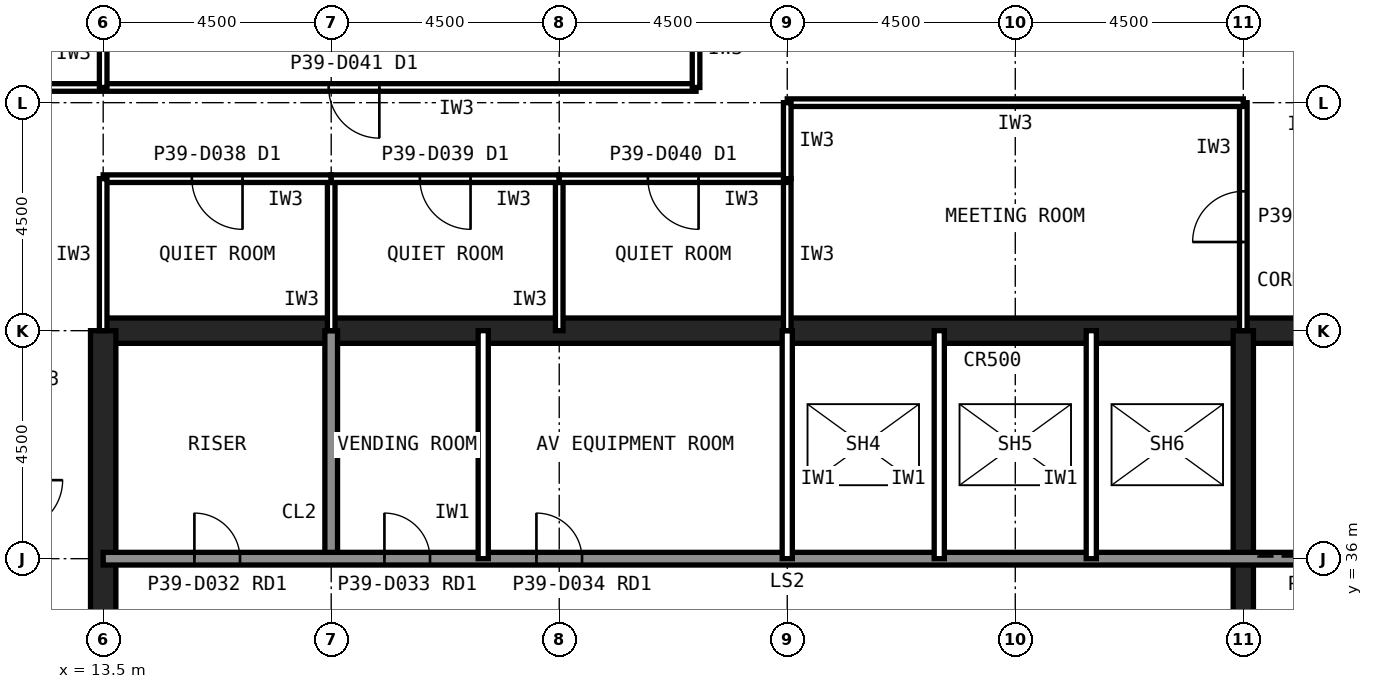
"""IFC4 building model, lengths in metres.
Left out: names, types, materials, properties, quantities, classifications, styles, units other than length and angle.
Written with IfcOpenShell. Run it as: python <this file> out.ifc"""

import sys

from ifc_helpers import new_model, si_unit, direction, frame, frame_2d, origin, place, context, subcontext, project, spatial, rectangle, extrude, element, fill, save


model = new_model("IFC4")
c1 = context("Model", 3, precision=1e-05, world=origin(), true_north=direction((0.0, 1.0)))
c2 = subcontext(c1, "Body", "Model", "MODEL_VIEW")
j1 = project(units=[si_unit("LENGTHUNIT", "METRE"), si_unit("PLANEANGLEUNIT", "RADIAN")], contexts=[c1])
p1 = place(None, origin())
s1 = spatial("IfcSite", under=j1, at=p1, CompositionType="ELEMENT")
p2 = place(p1, origin())
s2 = spatial("IfcBuilding", under=s1, at=p2, CompositionType="ELEMENT")
p3 = place(p2, frame((0.0, 0.0, 167.6)))
s3 = spatial("IfcBuildingStorey", under=s2, at=p3, CompositionType="ELEMENT", Elevation=167.6)
p4 = place(p3, frame((40.5, 40.5, 0.0), z_axis=(0.0, 0.0, 1.0), x_axis=(-1.0, 0.0, 0.0)))
e1 = element("IfcWall", 1, at=p4, inside=s3, PredefinedType="SHEAR", context=c2, shape_type="SweptSolid", body=[
    extrude(rectangle(XDim=27.0, YDim=0.5, at=frame_2d((13.5, 0.0))), origin(), (0.0, 0.0, 1.0), 4.0),
])
p5 = place(p3, frame((13.5, 40.5, 0.0), z_axis=(0.0, 0.0, 1.0), x_axis=(0.0, -1.0, 0.0)))
e2 = element("IfcWall", 2, at=p5, inside=s3, PredefinedType="SHEAR", context=c2, shape_type="SweptSolid", body=[
    extrude(rectangle(XDim=27.0, YDim=0.5, at=frame_2d((13.5, 0.0))), origin(), (0.0, 0.0, 1.0), 4.0),
])
p6 = place(p5, frame((19.65, 0.0, 0.0)))
e3 = element("IfcOpeningElement", 3, at=p6, cuts=e2, PredefinedType="OPENING", context=c2, shape_type="SweptSolid", body=[
    extrude(rectangle(XDim=1.2, YDim=2.1, at=frame_2d((0.6, 1.05))), frame((0.0, 0.26, 0.0), z_axis=(0.0, -1.0, 0.0), x_axis=(1.0, 0.0, 0.0)), (0.0, 0.0, 1.0), 0.52),
])
p7 = place(p5, frame((5.85, 0.0, 0.0)))
e4 = element("IfcOpeningElement", 4, at=p7, cuts=e2, PredefinedType="OPENING", context=c2, shape_type="SweptSolid", body=[
    extrude(rectangle(XDim=1.8, YDim=2.1, at=frame_2d((0.9, 1.05))), frame((0.0, 0.26, 0.0), z_axis=(0.0, -1.0, 0.0), x_axis=(1.0, 0.0, 0.0)), (0.0, 0.0, 1.0), 0.52),
])
p8 = place(p3, frame((18.0, 36.0, 0.0), z_axis=(0.0, 0.0, 1.0), x_axis=(0.0, 1.0, 0.0)))
e5 = element("IfcWall", 5, at=p8, inside=s3, PredefinedType="SOLIDWALL", context=c2, shape_type="SweptSolid", body=[
    extrude(rectangle(XDim=4.5, YDim=0.25, at=frame_2d((2.25, 0.0))), origin(), (0.0, 0.0, 1.0), 3.84),
])
p9 = place(p3, frame((36.0, 22.5, 0.0), z_axis=(0.0, 0.0, 1.0), x_axis=(0.0, 1.0, 0.0)))
e6 = element("IfcWall", 6, at=p9, inside=s3, PredefinedType="SHEAR", context=c2, shape_type="SweptSolid", body=[
    extrude(rectangle(XDim=18.0, YDim=0.4, at=frame_2d((9.0, 0.0))), origin(), (0.0, 0.0, 1.0), 4.0),
])
p10 = place(p3, frame((13.5, 36.0, 0.0), z_axis=(0.0, 0.0, 1.0), x_axis=(1.0, 0.0, 0.0)))
e7 = element("IfcWall", 7, at=p10, inside=s3, PredefinedType="SOLIDWALL", context=c2, shape_type="SweptSolid", body=[
    extrude(rectangle(XDim=27.0, YDim=0.25, at=frame_2d((13.5, 0.0))), origin(), (0.0, 0.0, 1.0), 3.84),
])
p11 = place(p10, frame((1.8, 0.0, 0.0)))
e8 = element("IfcOpeningElement", 8, at=p11, cuts=e7, PredefinedType="OPENING", context=c2, shape_type="SweptSolid", body=[
    extrude(rectangle(XDim=0.9, YDim=2.1, at=frame_2d((0.45, 1.05))), frame((0.0, 0.135, 0.0), z_axis=(0.0, -1.0, 0.0), x_axis=(1.0, 0.0, 0.0)), (0.0, 0.0, 1.0), 0.27),
])
p12 = place(p10, frame((5.55, 0.0, 0.0)))
e9 = element("IfcOpeningElement", 9, at=p12, cuts=e7, PredefinedType="OPENING", context=c2, shape_type="SweptSolid", body=[
    extrude(rectangle(XDim=0.9, YDim=2.1, at=frame_2d((0.45, 1.05))), frame((0.0, 0.135, 0.0), z_axis=(0.0, -1.0, 0.0), x_axis=(1.0, 0.0, 0.0)), (0.0, 0.0, 1.0), 0.27),
])
p13 = place(p10, frame((8.55, 0.0, 0.0)))
e10 = element("IfcOpeningElement", 10, at=p13, cuts=e7, PredefinedType="OPENING", context=c2, shape_type="SweptSolid", body=[
    extrude(rectangle(XDim=0.9, YDim=2.1, at=frame_2d((0.45, 1.05))), frame((0.0, 0.135, 0.0), z_axis=(0.0, -1.0, 0.0), x_axis=(1.0, 0.0, 0.0)), (0.0, 0.0, 1.0), 0.27),
])
p14 = place(p10, frame((24.1, 0.0, 0.0)))
e11 = element("IfcOpeningElement", 11, at=p14, cuts=e7, PredefinedType="OPENING", context=c2, shape_type="SweptSolid", body=[
    extrude(rectangle(XDim=1.3, YDim=2.2, at=frame_2d((0.65, 1.1))), frame((0.0, 0.135, 0.0), z_axis=(0.0, -1.0, 0.0), x_axis=(1.0, 0.0, 0.0)), (0.0, 0.0, 1.0), 0.27),
])
for number, where, z_axis, x_axis in (
    (12, (21.0, 36.0, 0.0), (0.0, 0.0, 1.0), (0.0, 1.0, 0.0)),
    (13, (27.0, 36.0, 0.0), (0.0, 0.0, 1.0), (0.0, 1.0, 0.0)),
    (14, (30.0, 36.0, 0.0), (0.0, 0.0, 1.0), (0.0, 1.0, 0.0)),
    (15, (33.0, 36.0, 0.0), (0.0, 0.0, 1.0), (0.0, 1.0, 0.0)),
):
    element("IfcWall", number, at=place(p3, frame(where, z_axis=z_axis, x_axis=x_axis)), inside=s3, PredefinedType="PARTITIONING", context=c2, shape_type="SweptSolid", body=[
        extrude(rectangle(XDim=4.5, YDim=0.2, at=frame_2d((2.25, 0.0))), origin(), (0.0, 0.0, 1.0), 3.84),
    ])
p15 = place(p3, frame((25.2, 45.3, 0.0), z_axis=(0.0, 0.0, 1.0), x_axis=(-1.0, 0.0, 0.0)))
e16 = element("IfcWall", 16, at=p15, inside=s3, PredefinedType="PARTITIONING", context=c2, shape_type="SweptSolid", body=[
    extrude(rectangle(XDim=13.5, YDim=0.15, at=frame_2d((6.75, 0.0))), origin(), (0.0, 0.0, 1.0), 3.84),
])
p16 = place(p15, frame((6.25, 0.0, 0.0)))
e17 = element("IfcOpeningElement", 17, at=p16, cuts=e16, PredefinedType="OPENING", context=c2, shape_type="SweptSolid", body=[
    extrude(rectangle(XDim=1.0, YDim=2.1, at=frame_2d((0.5, 1.05))), frame((0.0, 0.085, 0.0), z_axis=(0.0, -1.0, 0.0), x_axis=(1.0, 0.0, 0.0)), (0.0, 0.0, 1.0), 0.17),
])
p17 = place(p3, frame((25.2, 46.8, 0.0), z_axis=(0.0, 0.0, 1.0), x_axis=(0.0, -1.0, 0.0)))
e18 = element("IfcWall", 18, at=p17, inside=s3, PredefinedType="PARTITIONING", context=c2, shape_type="SweptSolid", body=[
    extrude(rectangle(XDim=1.5, YDim=0.15, at=frame_2d((0.75, 0.0))), origin(), (0.0, 0.0, 1.0), 3.84),
])
p18 = place(p3, frame((18.0, 40.5, 0.0), z_axis=(0.0, 0.0, 1.0), x_axis=(0.0, 1.0, 0.0)))
e19 = element("IfcWall", 19, at=p18, inside=s3, PredefinedType="PARTITIONING", context=c2, shape_type="SweptSolid", body=[
    extrude(rectangle(XDim=3.0, YDim=0.15, at=frame_2d((1.5, 0.0))), origin(), (0.0, 0.0, 1.0), 2.989),
])
p19 = place(p3, frame((18.0, 43.5, 0.0), z_axis=(0.0, 0.0, 1.0), x_axis=(-1.0, 0.0, 0.0)))
e20 = element("IfcWall", 20, at=p19, inside=s3, PredefinedType="PARTITIONING", context=c2, shape_type="SweptSolid", body=[
    extrude(rectangle(XDim=4.5, YDim=0.15, at=frame_2d((2.25, 0.0))), origin(), (0.0, 0.0, 1.0), 3.84),
])
p20 = place(p19, frame((1.75, 0.0, 0.0)))
e21 = element("IfcOpeningElement", 21, at=p20, cuts=e20, PredefinedType="OPENING", context=c2, shape_type="SweptSolid", body=[
    extrude(rectangle(XDim=1.0, YDim=2.1, at=frame_2d((0.5, 1.05))), frame((0.0, 0.085, 0.0), z_axis=(0.0, -1.0, 0.0), x_axis=(1.0, 0.0, 0.0)), (0.0, 0.0, 1.0), 0.17),
])
for number, where, z_axis, x_axis in (
    (22, (13.5, 43.5, 0.0), (0.0, 0.0, 1.0), (0.0, -1.0, 0.0)),
    (23, (22.5, 40.5, 0.0), (0.0, 0.0, 1.0), (0.0, 1.0, 0.0)),
):
    element("IfcWall", number, at=place(p3, frame(where, z_axis=z_axis, x_axis=x_axis)), inside=s3, PredefinedType="PARTITIONING", context=c2, shape_type="SweptSolid", body=[
        extrude(rectangle(XDim=3.0, YDim=0.15, at=frame_2d((1.5, 0.0))), origin(), (0.0, 0.0, 1.0), 2.989),
    ])
p21 = place(p3, frame((22.5, 43.5, 0.0), z_axis=(0.0, 0.0, 1.0), x_axis=(-1.0, 0.0, 0.0)))
e24 = element("IfcWall", 24, at=p21, inside=s3, PredefinedType="PARTITIONING", context=c2, shape_type="SweptSolid", body=[
    extrude(rectangle(XDim=4.5, YDim=0.15, at=frame_2d((2.25, 0.0))), origin(), (0.0, 0.0, 1.0), 3.84),
])
p22 = place(p21, frame((1.75, 0.0, 0.0)))
e25 = element("IfcOpeningElement", 25, at=p22, cuts=e24, PredefinedType="OPENING", context=c2, shape_type="SweptSolid", body=[
    extrude(rectangle(XDim=1.0, YDim=2.1, at=frame_2d((0.5, 1.05))), frame((0.0, 0.085, 0.0), z_axis=(0.0, -1.0, 0.0), x_axis=(1.0, 0.0, 0.0)), (0.0, 0.0, 1.0), 0.17),
])
p23 = place(p3, frame((27.0, 40.5, 0.0), z_axis=(0.0, 0.0, 1.0), x_axis=(0.0, 1.0, 0.0)))
e26 = element("IfcWall", 26, at=p23, inside=s3, PredefinedType="PARTITIONING", context=c2, shape_type="SweptSolid", body=[
    extrude(rectangle(XDim=3.0, YDim=0.15, at=frame_2d((1.5, 0.0))), origin(), (0.0, 0.0, 1.0), 2.989),
])
p24 = place(p3, frame((27.0, 43.5, 0.0), z_axis=(0.0, 0.0, 1.0), x_axis=(-1.0, 0.0, 0.0)))
e27 = element("IfcWall", 27, at=p24, inside=s3, PredefinedType="PARTITIONING", context=c2, shape_type="SweptSolid", body=[
    extrude(rectangle(XDim=4.5, YDim=0.15, at=frame_2d((2.25, 0.0))), origin(), (0.0, 0.0, 1.0), 3.84),
])
p25 = place(p24, frame((1.75, 0.0, 0.0)))
e28 = element("IfcOpeningElement", 28, at=p25, cuts=e27, PredefinedType="OPENING", context=c2, shape_type="SweptSolid", body=[
    extrude(rectangle(XDim=1.0, YDim=2.1, at=frame_2d((0.5, 1.05))), frame((0.0, 0.085, 0.0), z_axis=(0.0, -1.0, 0.0), x_axis=(1.0, 0.0, 0.0)), (0.0, 0.0, 1.0), 0.17),
])
p26 = place(p3, frame((36.0, 40.5, 0.0), z_axis=(0.0, 0.0, 1.0), x_axis=(0.0, 1.0, 0.0)))
e29 = element("IfcWall", 29, at=p26, inside=s3, PredefinedType="PARTITIONING", context=c2, shape_type="SweptSolid", body=[
    extrude(rectangle(XDim=4.5, YDim=0.15, at=frame_2d((2.25, 0.0))), origin(), (0.0, 0.0, 1.0), 2.989),
])
p27 = place(p26, frame((1.75, 0.0, 0.0)))
e30 = element("IfcOpeningElement", 30, at=p27, cuts=e29, PredefinedType="OPENING", context=c2, shape_type="SweptSolid", body=[
    extrude(rectangle(XDim=1.0, YDim=2.1, at=frame_2d((0.5, 1.05))), frame((0.0, 0.085, 0.0), z_axis=(0.0, -1.0, 0.0), x_axis=(1.0, 0.0, 0.0)), (0.0, 0.0, 1.0), 0.17),
])
p28 = place(p3, frame((36.0, 45.0, 0.0), z_axis=(0.0, 0.0, 1.0), x_axis=(-1.0, 0.0, 0.0)))
e31 = element("IfcWall", 31, at=p28, inside=s3, PredefinedType="PARTITIONING", context=c2, shape_type="SweptSolid", body=[
    extrude(rectangle(XDim=9.0, YDim=0.15, at=frame_2d((4.5, 0.0))), origin(), (0.0, 0.0, 1.0), 3.84),
])
p29 = place(p3, frame((27.0, 45.0, 0.0), z_axis=(0.0, 0.0, 1.0), x_axis=(0.0, -1.0, 0.0)))
e32 = element("IfcWall", 32, at=p29, inside=s3, PredefinedType="PARTITIONING", context=c2, shape_type="SweptSolid", body=[
    extrude(rectangle(XDim=1.5, YDim=0.15, at=frame_2d((0.75, 0.0))), origin(), (0.0, 0.0, 1.0), 2.989),
])
p30 = place(p3, frame((13.5, 45.3, 0.0), z_axis=(0.0, 0.0, 1.0), x_axis=(0.0, 1.0, 0.0)))
e33 = element("IfcWall", 33, at=p30, inside=s3, PredefinedType="PARTITIONING", context=c2, shape_type="SweptSolid", body=[
    extrude(rectangle(XDim=3.3, YDim=0.15, at=frame_2d((1.65, 0.0))), origin(), (0.0, 0.0, 1.0), 2.989),
])
p31 = place(p30, frame((1.15, 0.0, 0.0)))
e34 = element("IfcOpeningElement", 34, at=p31, cuts=e33, PredefinedType="OPENING", context=c2, shape_type="SweptSolid", body=[
    extrude(rectangle(XDim=1.0, YDim=2.1, at=frame_2d((0.5, 1.05))), frame((0.0, 0.085, 0.0), z_axis=(0.0, -1.0, 0.0), x_axis=(1.0, 0.0, 0.0)), (0.0, 0.0, 1.0), 0.17),
])
p32 = place(p11, origin())
e35 = element("IfcDoor", 35, at=p32, inside=s3, OperationType="SINGLE_SWING_LEFT", PredefinedType="DOOR", context=c2, shape_type="SweptSolid", body=[
    extrude(rectangle(XDim=0.9, YDim=2.1, at=frame_2d((0.45, 1.05))), frame((0.0, 0.025, 0.0), z_axis=(0.0, -1.0, 0.0), x_axis=(1.0, 0.0, 0.0)), (0.0, 0.0, 1.0), 0.05),
])
fill(e8, e35)
p33 = place(p12, origin())
e36 = element("IfcDoor", 36, at=p33, inside=s3, OperationType="SINGLE_SWING_LEFT", PredefinedType="DOOR", context=c2, shape_type="SweptSolid", body=[
    extrude(rectangle(XDim=0.9, YDim=2.1, at=frame_2d((0.45, 1.05))), frame((0.0, 0.025, 0.0), z_axis=(0.0, -1.0, 0.0), x_axis=(1.0, 0.0, 0.0)), (0.0, 0.0, 1.0), 0.05),
])
fill(e9, e36)
p34 = place(p13, origin())
e37 = element("IfcDoor", 37, at=p34, inside=s3, OperationType="SINGLE_SWING_LEFT", PredefinedType="DOOR", context=c2, shape_type="SweptSolid", body=[
    extrude(rectangle(XDim=0.9, YDim=2.1, at=frame_2d((0.45, 1.05))), frame((0.0, 0.025, 0.0), z_axis=(0.0, -1.0, 0.0), x_axis=(1.0, 0.0, 0.0)), (0.0, 0.0, 1.0), 0.05),
])
fill(e10, e37)
p35 = place(p16, origin())
e38 = element("IfcDoor", 38, at=p35, inside=s3, OperationType="SINGLE_SWING_LEFT", PredefinedType="DOOR", context=c2, shape_type="SweptSolid", body=[
    extrude(rectangle(XDim=1.0, YDim=2.1, at=frame_2d((0.5, 1.05))), frame((0.0, 0.025, 0.0), z_axis=(0.0, -1.0, 0.0), x_axis=(1.0, 0.0, 0.0)), (0.0, 0.0, 1.0), 0.05),
])
fill(e17, e38)
p36 = place(p20, origin())
e39 = element("IfcDoor", 39, at=p36, inside=s3, OperationType="SINGLE_SWING_LEFT", PredefinedType="DOOR", context=c2, shape_type="SweptSolid", body=[
    extrude(rectangle(XDim=1.0, YDim=2.1, at=frame_2d((0.5, 1.05))), frame((0.0, 0.025, 0.0), z_axis=(0.0, -1.0, 0.0), x_axis=(1.0, 0.0, 0.0)), (0.0, 0.0, 1.0), 0.05),
])
fill(e21, e39)
p37 = place(p22, origin())
e40 = element("IfcDoor", 40, at=p37, inside=s3, OperationType="SINGLE_SWING_LEFT", PredefinedType="DOOR", context=c2, shape_type="SweptSolid", body=[
    extrude(rectangle(XDim=1.0, YDim=2.1, at=frame_2d((0.5, 1.05))), frame((0.0, 0.025, 0.0), z_axis=(0.0, -1.0, 0.0), x_axis=(1.0, 0.0, 0.0)), (0.0, 0.0, 1.0), 0.05),
])
fill(e25, e40)
p38 = place(p25, origin())
e41 = element("IfcDoor", 41, at=p38, inside=s3, OperationType="SINGLE_SWING_LEFT", PredefinedType="DOOR", context=c2, shape_type="SweptSolid", body=[
    extrude(rectangle(XDim=1.0, YDim=2.1, at=frame_2d((0.5, 1.05))), frame((0.0, 0.025, 0.0), z_axis=(0.0, -1.0, 0.0), x_axis=(1.0, 0.0, 0.0)), (0.0, 0.0, 1.0), 0.05),
])
fill(e28, e41)
p39 = place(p27, origin())
e42 = element("IfcDoor", 42, at=p39, inside=s3, OperationType="SINGLE_SWING_LEFT", PredefinedType="DOOR", context=c2, shape_type="SweptSolid", body=[
    extrude(rectangle(XDim=1.0, YDim=2.1, at=frame_2d((0.5, 1.05))), frame((0.0, 0.025, 0.0), z_axis=(0.0, -1.0, 0.0), x_axis=(1.0, 0.0, 0.0)), (0.0, 0.0, 1.0), 0.05),
])
fill(e30, e42)
save(model, sys.argv[1])
